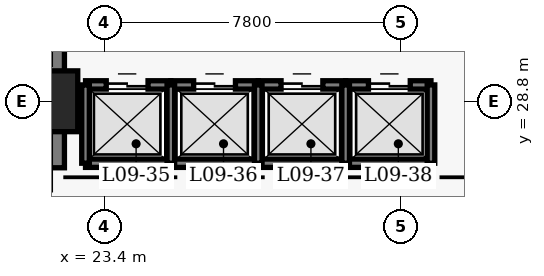
"""IFC4 building model, lengths in metres.
Left out: names, types, materials, properties, quantities, classifications, styles, units other than length and angle.
Written with IfcOpenShell. Run it as: python <this file> out.ifc"""

import sys

from ifc_helpers import new_model, si_unit, direction, frame, frame_2d, origin, origin_2d, place, context, subcontext, project, spatial, rectangle, extrude, element, fill, save


model = new_model("IFC4")
c1 = context("Model", 3, precision=1e-05, world=origin(), true_north=direction((0.0, 1.0)))
c2 = subcontext(c1, "Body", "Model", "MODEL_VIEW")
j1 = project(units=[si_unit("LENGTHUNIT", "METRE"), si_unit("PLANEANGLEUNIT", "RADIAN")], contexts=[c1])
p1 = place(None, origin())
s1 = spatial("IfcSite", under=j1, at=p1, CompositionType="ELEMENT")
p2 = place(p1, origin())
s2 = spatial("IfcBuilding", under=s1, at=p2, CompositionType="ELEMENT")
p3 = place(p2, frame((0.0, 0.0, 41.2)))
s3 = spatial("IfcBuildingStorey", under=s2, at=p3, CompositionType="ELEMENT", Elevation=41.2)
p4 = place(p3, frame((21.9, 27.05, 0.0), z_axis=(0.0, 0.0, 1.0), x_axis=(0.0, 1.0, 0.0)))
e1 = element("IfcWall", 1, at=p4, inside=s3, PredefinedType="SHEAR", context=c2, shape_type="SweptSolid", body=[
    extrude(rectangle(XDim=13.72, YDim=0.9, at=frame_2d((6.86, 0.0))), origin(), (0.0, 0.0, 1.0), 3.8),
])
p5 = place(p3, frame((21.9, 28.8, 0.0), z_axis=(0.0, 0.0, 1.0), x_axis=(1.0, 0.0, 0.0)))
e2 = element("IfcColumn", 2, at=p5, inside=s3, PredefinedType="COLUMN", context=c2, shape_type="SweptSolid", body=[
    extrude(rectangle(XDim=1.6, YDim=1.6, at=origin_2d()), origin(), (0.0, 0.0, 1.0), 3.8),
])
p6 = place(p3, frame((22.905, 29.23, 0.0), z_axis=(0.0, 0.0, 1.0), x_axis=(1.0, 0.0, 0.0)))
e3 = element("IfcWall", 3, at=p6, inside=s3, PredefinedType="SHEAR", context=c2, shape_type="SweptSolid", body=[
    extrude(rectangle(XDim=2.245, YDim=0.22, at=frame_2d((1.123, 0.0))), origin(), (0.0, 0.0, 1.0), 3.8),
])
p7 = place(p6, frame((0.545, 0.0, 0.0)))
e4 = element("IfcOpeningElement", 4, at=p7, cuts=e3, PredefinedType="OPENING", context=c2, shape_type="SweptSolid", body=[
    extrude(rectangle(XDim=1.1, YDim=2.15, at=frame_2d((0.55, 1.075))), frame((0.0, 0.12, 0.0), z_axis=(0.0, -1.0, 0.0), x_axis=(1.0, 0.0, 0.0)), (0.0, 0.0, 1.0), 0.24),
])
p8 = place(p3, frame((22.905, 27.17, 0.0), z_axis=(0.0, 0.0, 1.0), x_axis=(1.0, 0.0, 0.0)))
e5 = element("IfcWall", 5, at=p8, inside=s3, PredefinedType="SHEAR", context=c2, shape_type="SweptSolid", body=[
    extrude(rectangle(XDim=2.245, YDim=0.22, at=frame_2d((1.123, 0.0))), origin(), (0.0, 0.0, 1.0), 3.8),
])
p9 = place(p3, frame((22.905, 27.17, 0.0), z_axis=(0.0, 0.0, 1.0), x_axis=(0.0, 1.0, 0.0)))
e6 = element("IfcWall", 6, at=p9, inside=s3, PredefinedType="SHEAR", context=c2, shape_type="SweptSolid", body=[
    extrude(rectangle(XDim=2.06, YDim=0.2, at=frame_2d((1.03, 0.0))), origin(), (0.0, 0.0, 1.0), 3.8),
])
p10 = place(p3, frame((25.15, 29.23, 0.0), z_axis=(0.0, 0.0, 1.0), x_axis=(1.0, 0.0, 0.0)))
e7 = element("IfcWall", 7, at=p10, inside=s3, PredefinedType="SHEAR", context=c2, shape_type="SweptSolid", body=[
    extrude(rectangle(XDim=2.3, YDim=0.22, at=frame_2d((1.15, 0.0))), origin(), (0.0, 0.0, 1.0), 3.8),
])
p11 = place(p10, frame((0.6, 0.0, 0.0)))
e8 = element("IfcOpeningElement", 8, at=p11, cuts=e7, PredefinedType="OPENING", context=c2, shape_type="SweptSolid", body=[
    extrude(rectangle(XDim=1.1, YDim=2.15, at=frame_2d((0.55, 1.075))), frame((0.0, 0.12, 0.0), z_axis=(0.0, -1.0, 0.0), x_axis=(1.0, 0.0, 0.0)), (0.0, 0.0, 1.0), 0.24),
])
p12 = place(p3, frame((25.15, 27.17, 0.0), z_axis=(0.0, 0.0, 1.0), x_axis=(1.0, 0.0, 0.0)))
e9 = element("IfcWall", 9, at=p12, inside=s3, PredefinedType="SHEAR", context=c2, shape_type="SweptSolid", body=[
    extrude(rectangle(XDim=2.3, YDim=0.22, at=frame_2d((1.15, 0.0))), origin(), (0.0, 0.0, 1.0), 3.8),
])
p13 = place(p3, frame((25.15, 27.17, 0.0), z_axis=(0.0, 0.0, 1.0), x_axis=(0.0, 1.0, 0.0)))
e10 = element("IfcWall", 10, at=p13, inside=s3, PredefinedType="SHEAR", context=c2, shape_type="SweptSolid", body=[
    extrude(rectangle(XDim=2.06, YDim=0.2, at=frame_2d((1.03, 0.0))), origin(), (0.0, 0.0, 1.0), 3.8),
])
p14 = place(p3, frame((27.45, 29.23, 0.0), z_axis=(0.0, 0.0, 1.0), x_axis=(1.0, 0.0, 0.0)))
e11 = element("IfcWall", 11, at=p14, inside=s3, PredefinedType="SHEAR", context=c2, shape_type="SweptSolid", body=[
    extrude(rectangle(XDim=2.3, YDim=0.22, at=frame_2d((1.15, 0.0))), origin(), (0.0, 0.0, 1.0), 3.8),
])
p15 = place(p14, frame((0.6, 0.0, 0.0)))
e12 = element("IfcOpeningElement", 12, at=p15, cuts=e11, PredefinedType="OPENING", context=c2, shape_type="SweptSolid", body=[
    extrude(rectangle(XDim=1.1, YDim=2.15, at=frame_2d((0.55, 1.075))), frame((0.0, 0.12, 0.0), z_axis=(0.0, -1.0, 0.0), x_axis=(1.0, 0.0, 0.0)), (0.0, 0.0, 1.0), 0.24),
])
p16 = place(p3, frame((27.45, 27.17, 0.0), z_axis=(0.0, 0.0, 1.0), x_axis=(1.0, 0.0, 0.0)))
e13 = element("IfcWall", 13, at=p16, inside=s3, PredefinedType="SHEAR", context=c2, shape_type="SweptSolid", body=[
    extrude(rectangle(XDim=2.3, YDim=0.22, at=frame_2d((1.15, 0.0))), origin(), (0.0, 0.0, 1.0), 3.8),
])
p17 = place(p3, frame((27.45, 27.17, 0.0), z_axis=(0.0, 0.0, 1.0), x_axis=(0.0, 1.0, 0.0)))
e14 = element("IfcWall", 14, at=p17, inside=s3, PredefinedType="SHEAR", context=c2, shape_type="SweptSolid", body=[
    extrude(rectangle(XDim=2.06, YDim=0.2, at=frame_2d((1.03, 0.0))), origin(), (0.0, 0.0, 1.0), 3.8),
])
p18 = place(p3, frame((29.75, 29.23, 0.0), z_axis=(0.0, 0.0, 1.0), x_axis=(1.0, 0.0, 0.0)))
e15 = element("IfcWall", 15, at=p18, inside=s3, PredefinedType="SHEAR", context=c2, shape_type="SweptSolid", body=[
    extrude(rectangle(XDim=2.245, YDim=0.22, at=frame_2d((1.123, 0.0))), origin(), (0.0, 0.0, 1.0), 3.8),
])
p19 = place(p18, frame((0.6, 0.0, 0.0)))
e16 = element("IfcOpeningElement", 16, at=p19, cuts=e15, PredefinedType="OPENING", context=c2, shape_type="SweptSolid", body=[
    extrude(rectangle(XDim=1.1, YDim=2.15, at=frame_2d((0.55, 1.075))), frame((0.0, 0.12, 0.0), z_axis=(0.0, -1.0, 0.0), x_axis=(1.0, 0.0, 0.0)), (0.0, 0.0, 1.0), 0.24),
])
p20 = place(p3, frame((29.75, 27.17, 0.0), z_axis=(0.0, 0.0, 1.0), x_axis=(1.0, 0.0, 0.0)))
e17 = element("IfcWall", 17, at=p20, inside=s3, PredefinedType="SHEAR", context=c2, shape_type="SweptSolid", body=[
    extrude(rectangle(XDim=2.245, YDim=0.22, at=frame_2d((1.123, 0.0))), origin(), (0.0, 0.0, 1.0), 3.8),
])
for number, where, z_axis, x_axis in (
    (18, (29.75, 27.17, 0.0), (0.0, 0.0, 1.0), (0.0, 1.0, 0.0)),
    (19, (31.995, 27.17, 0.0), (0.0, 0.0, 1.0), (0.0, 1.0, 0.0)),
):
    element("IfcWall", number, at=place(p3, frame(where, z_axis=z_axis, x_axis=x_axis)), inside=s3, PredefinedType="SHEAR", context=c2, shape_type="SweptSolid", body=[
        extrude(rectangle(XDim=2.06, YDim=0.2, at=frame_2d((1.03, 0.0))), origin(), (0.0, 0.0, 1.0), 3.8),
    ])
p21 = place(p7, origin())
e20 = element("IfcDoor", 20, at=p21, inside=s3, OperationType="DOUBLE_DOOR_SLIDING", PredefinedType="DOOR", context=c2, shape_type="SweptSolid", body=[
    extrude(rectangle(XDim=1.1, YDim=2.15, at=frame_2d((0.55, 1.075))), frame((0.0, 0.025, 0.0), z_axis=(0.0, -1.0, 0.0), x_axis=(1.0, 0.0, 0.0)), (0.0, 0.0, 1.0), 0.05),
])
fill(e4, e20)
p22 = place(p11, origin())
e21 = element("IfcDoor", 21, at=p22, inside=s3, OperationType="DOUBLE_DOOR_SLIDING", PredefinedType="DOOR", context=c2, shape_type="SweptSolid", body=[
    extrude(rectangle(XDim=1.1, YDim=2.15, at=frame_2d((0.55, 1.075))), frame((0.0, 0.025, 0.0), z_axis=(0.0, -1.0, 0.0), x_axis=(1.0, 0.0, 0.0)), (0.0, 0.0, 1.0), 0.05),
])
fill(e8, e21)
p23 = place(p15, origin())
e22 = element("IfcDoor", 22, at=p23, inside=s3, OperationType="DOUBLE_DOOR_SLIDING", PredefinedType="DOOR", context=c2, shape_type="SweptSolid", body=[
    extrude(rectangle(XDim=1.1, YDim=2.15, at=frame_2d((0.55, 1.075))), frame((0.0, 0.025, 0.0), z_axis=(0.0, -1.0, 0.0), x_axis=(1.0, 0.0, 0.0)), (0.0, 0.0, 1.0), 0.05),
])
fill(e12, e22)
p24 = place(p19, origin())
e23 = element("IfcDoor", 23, at=p24, inside=s3, OperationType="DOUBLE_DOOR_SLIDING", PredefinedType="DOOR", context=c2, shape_type="SweptSolid", body=[
    extrude(rectangle(XDim=1.1, YDim=2.15, at=frame_2d((0.55, 1.075))), frame((0.0, 0.025, 0.0), z_axis=(0.0, -1.0, 0.0), x_axis=(1.0, 0.0, 0.0)), (0.0, 0.0, 1.0), 0.05),
])
fill(e16, e23)
save(model, sys.argv[1])
